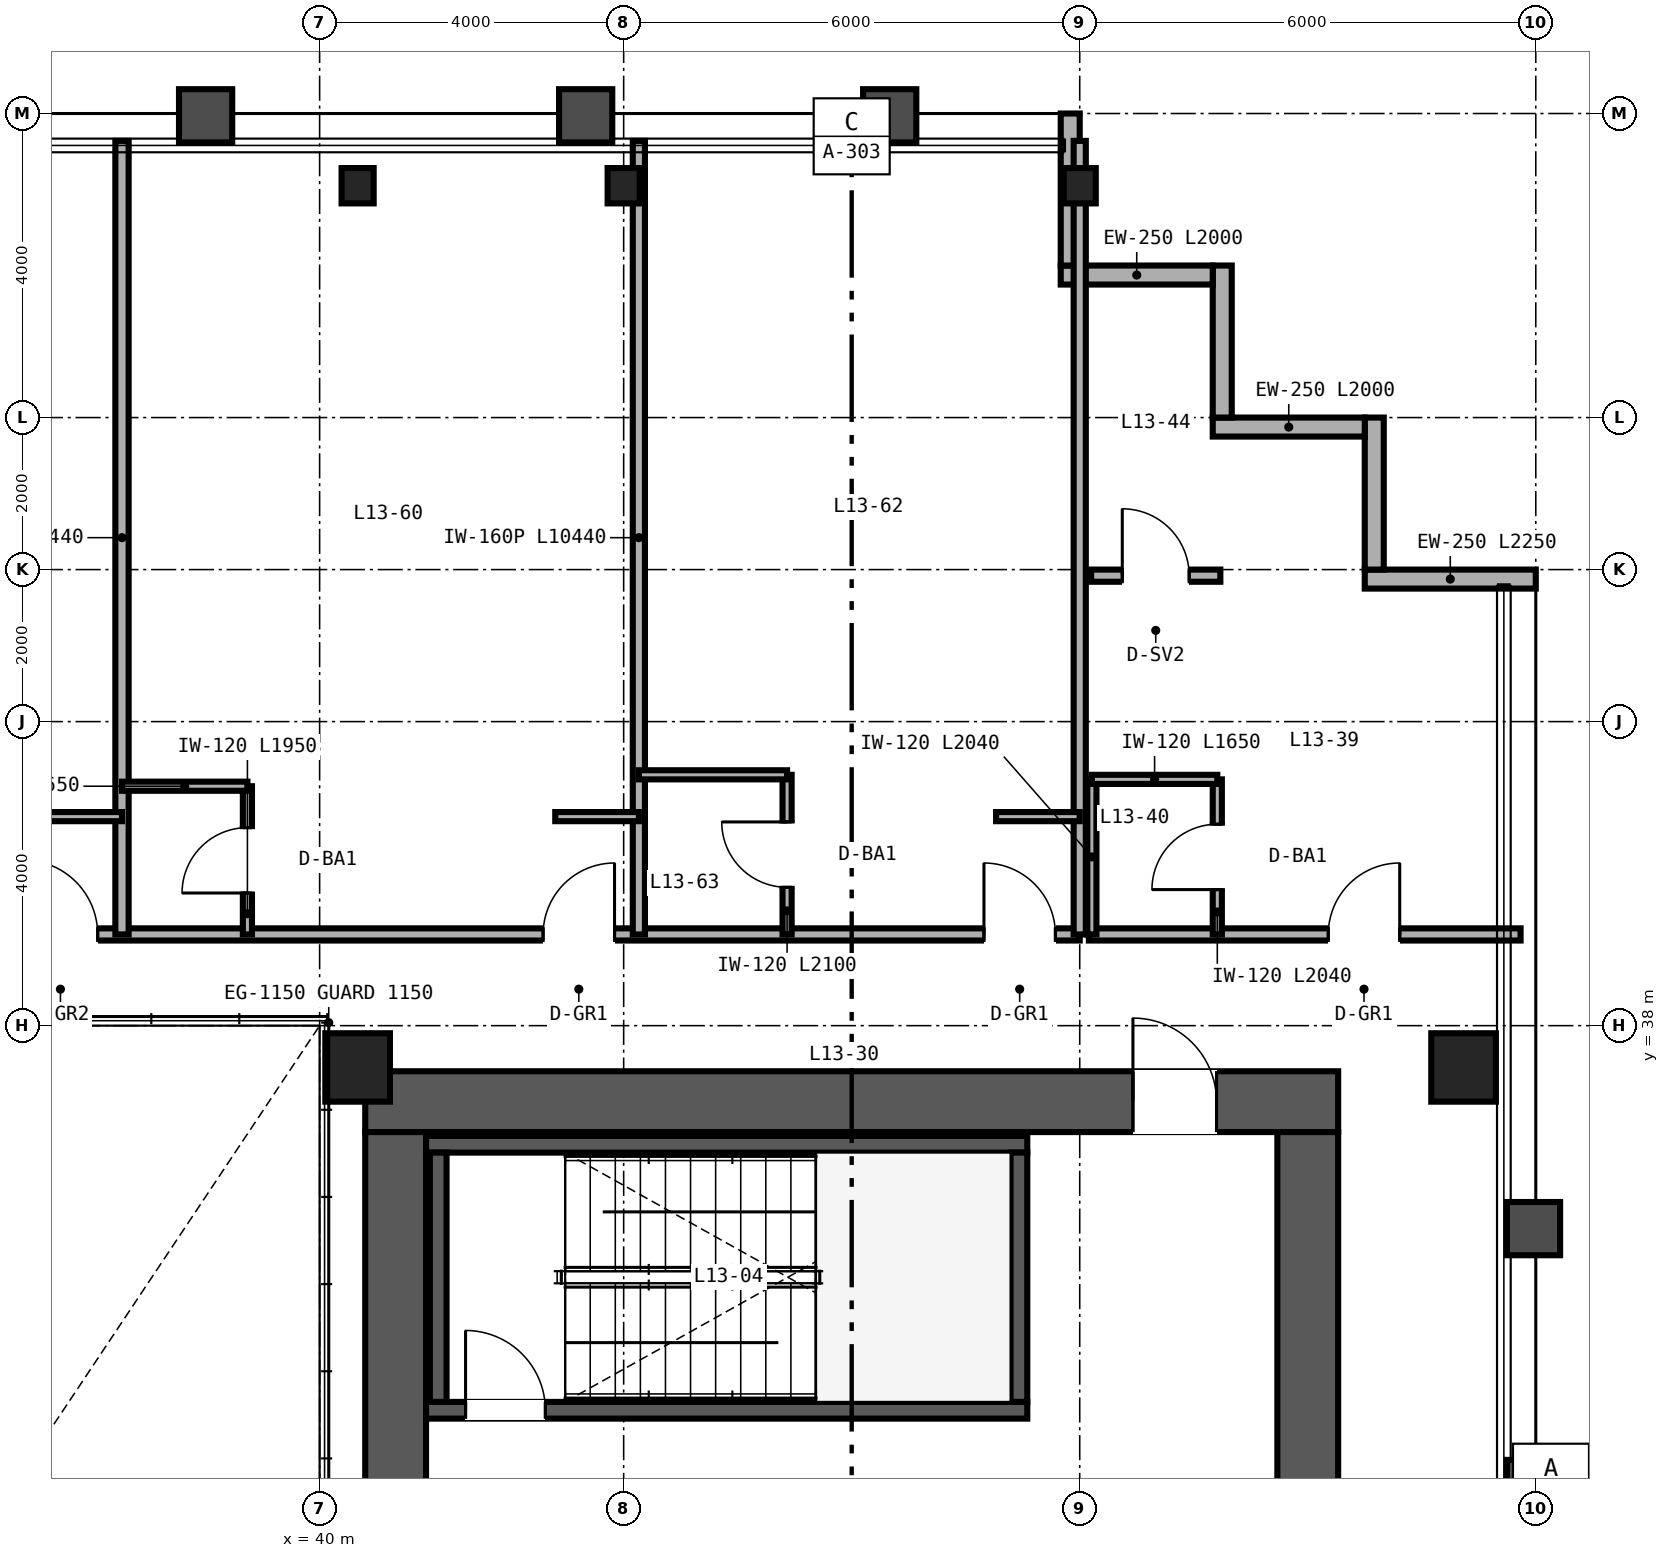
"""IFC4 building model, lengths in metres.
Left out: names, types, materials, properties, quantities, classifications, styles, units other than length and angle.
Written with IfcOpenShell. Run it as: python <this file> out.ifc"""

import sys

from ifc_helpers import new_model, si_unit, direction, frame, frame_2d, origin, origin_2d, place, context, subcontext, project, spatial, rectangle, hollow_rectangle, i_section, extrude, source, transform, mapped, element, fill, save


model = new_model("IFC4")
c1 = context("Model", 3, precision=1e-05, world=origin(), true_north=direction((0.0, 1.0)))
c2 = subcontext(c1, "Body", "Model", "MODEL_VIEW")
j1 = project(units=[si_unit("LENGTHUNIT", "METRE"), si_unit("PLANEANGLEUNIT", "RADIAN")], contexts=[c1])
p1 = place(None, origin())
s1 = spatial("IfcSite", under=j1, at=p1, CompositionType="ELEMENT")
p2 = place(p1, origin())
s2 = spatial("IfcBuilding", under=s1, at=p2, CompositionType="ELEMENT")
p3 = place(p2, frame((0.0, 0.0, 56.4)))
s3 = spatial("IfcBuildingStorey", under=s2, at=p3, CompositionType="ELEMENT", Elevation=56.4)
p4 = place(p3, frame((40.6, 37.0, 0.0), z_axis=(0.0, 0.0, 1.0), x_axis=(1.0, 0.0, 0.0)))
e1 = element("IfcWall", 1, at=p4, inside=s3, PredefinedType="SHEAR", context=c2, shape_type="SweptSolid", body=[
    extrude(rectangle(XDim=12.8, YDim=0.8, at=frame_2d((6.4, 0.0))), origin(), (0.0, 0.0, 1.0), 3.35),
])
p5 = place(p4, frame((10.1, 0.0, 0.0)))
e2 = element("IfcOpeningElement", 2, at=p5, cuts=e1, PredefinedType="OPENING", context=c2, shape_type="SweptSolid", body=[
    extrude(rectangle(XDim=1.1, YDim=2.15, at=frame_2d((0.55, 1.075))), frame((0.0, 0.41, 0.0), z_axis=(0.0, -1.0, 0.0), x_axis=(1.0, 0.0, 0.0)), (0.0, 0.0, 1.0), 0.82),
])
for number, where, z_axis, x_axis in (
    (3, (41.0, 15.4, 0.0), (0.0, 0.0, 1.0), (0.0, 1.0, 0.0)),
    (4, (53.0, 15.4, 0.0), (0.0, 0.0, 1.0), (0.0, 1.0, 0.0)),
):
    element("IfcWall", number, at=place(p3, frame(where, z_axis=z_axis, x_axis=x_axis)), inside=s3, PredefinedType="SHEAR", context=c2, shape_type="SweptSolid", body=[
        extrude(rectangle(XDim=21.2, YDim=0.8, at=frame_2d((10.6, 0.0))), origin(), (0.0, 0.0, 1.0), 3.35),
    ])
p6 = place(p3, frame((41.4, 32.94, 0.0), z_axis=(0.0, 0.0, 1.0), x_axis=(1.0, 0.0, 0.0)))
e5 = element("IfcWall", 5, at=p6, inside=s3, PredefinedType="SHEAR", context=c2, shape_type="SweptSolid", body=[
    extrude(rectangle(XDim=7.91, YDim=0.22, at=frame_2d((3.955, 0.0))), origin(), (0.0, 0.0, 1.0), 3.4),
])
p7 = place(p6, frame((0.52, 0.0, 0.0)))
e6 = element("IfcOpeningElement", 6, at=p7, cuts=e5, PredefinedType="OPENING", context=c2, shape_type="SweptSolid", body=[
    extrude(rectangle(XDim=1.05, YDim=2.15, at=frame_2d((0.525, 1.075))), frame((0.0, 0.12, 0.0), z_axis=(0.0, -1.0, 0.0), x_axis=(1.0, 0.0, 0.0)), (0.0, 0.0, 1.0), 0.24),
])
p8 = place(p3, frame((41.4, 36.44, 0.0), z_axis=(0.0, 0.0, 1.0), x_axis=(1.0, 0.0, 0.0)))
e7 = element("IfcWall", 7, at=p8, inside=s3, PredefinedType="SHEAR", context=c2, shape_type="SweptSolid", body=[
    extrude(rectangle(XDim=7.91, YDim=0.22, at=frame_2d((3.955, 0.0))), origin(), (0.0, 0.0, 1.0), 3.4),
])
for number, where, z_axis, x_axis in (
    (8, (41.56, 33.05, 0.0), (0.0, 0.0, 1.0), (0.0, 1.0, 0.0)),
    (9, (49.2, 33.05, 0.0), (0.0, 0.0, 1.0), (0.0, 1.0, 0.0)),
):
    element("IfcWall", number, at=place(p3, frame(where, z_axis=z_axis, x_axis=x_axis)), inside=s3, PredefinedType="SHEAR", context=c2, shape_type="SweptSolid", body=[
        extrude(rectangle(XDim=3.28, YDim=0.22, at=frame_2d((1.64, 0.0))), origin(), (0.0, 0.0, 1.0), 3.4),
    ])
m1 = source(origin(), c2, "Body", "SweptSolid", [
    extrude(hollow_rectangle(XDim=0.85, YDim=0.9, WallThickness=0.04, at=origin_2d()), origin(), (0.0, 0.0, 1.0), 3.35),
])
for number, where, z_axis, x_axis in (
    (10, (40.5, 37.45, 0.0), (0.0, 0.0, 1.0), (1.0, 0.0, 0.0)),
    (11, (55.05, 37.45, 0.0), (0.0, 0.0, 1.0), (1.0, 0.0, 0.0)),
):
    element("IfcColumn", number, at=place(p3, frame(where, z_axis=z_axis, x_axis=x_axis)), inside=s3, PredefinedType="COLUMN", context=c2, shape_type="MappedRepresentation", body=[
        mapped(m1, transform((0.0, 0.0, 0.0), scale=1.0)),
    ])
m2 = source(origin(), c2, "Body", "SweptSolid", [
    extrude(i_section(OverallWidth=0.422, OverallDepth=0.465, WebThickness=0.045, FlangeThickness=0.073, FilletRadius=0.025, at=origin_2d()), origin(), (0.0, 0.0, 1.0), 3.35),
])
for number, where, z_axis, x_axis in (
    (12, (40.5, 49.05, 0.0), (0.0, 0.0, 1.0), (1.0, 0.0, 0.0)),
    (13, (44.0, 49.05, 0.0), (0.0, 0.0, 1.0), (1.0, 0.0, 0.0)),
    (14, (50.0, 49.05, 0.0), (0.0, 0.0, 1.0), (1.0, 0.0, 0.0)),
):
    element("IfcColumn", number, at=place(p3, frame(where, z_axis=z_axis, x_axis=x_axis)), inside=s3, PredefinedType="COLUMN", context=c2, shape_type="MappedRepresentation", body=[
        mapped(m2, transform((0.0, 0.0, 0.0), scale=1.0)),
    ])
p9 = place(p3, frame((56.0, 43.875, 0.0), z_axis=(0.0, 0.0, 1.0), x_axis=(-1.0, 0.0, 0.0)))
e15 = element("IfcWall", 15, at=p9, inside=s3, PredefinedType="SOLIDWALL", context=c2, shape_type="SweptSolid", body=[
    extrude(rectangle(XDim=2.25, YDim=0.25, at=frame_2d((1.125, 0.0))), origin(), (0.0, 0.0, 1.0), 3.35),
])
for number, where, z_axis, x_axis in (
    (16, (53.875, 44.0, 0.0), (0.0, 0.0, 1.0), (0.0, 1.0, 0.0)),
    (17, (53.75, 45.875, 0.0), (0.0, 0.0, 1.0), (-1.0, 0.0, 0.0)),
    (18, (51.875, 46.0, 0.0), (0.0, 0.0, 1.0), (0.0, 1.0, 0.0)),
    (19, (51.75, 47.875, 0.0), (0.0, 0.0, 1.0), (-1.0, 0.0, 0.0)),
):
    element("IfcWall", number, at=place(p3, frame(where, z_axis=z_axis, x_axis=x_axis)), inside=s3, PredefinedType="SOLIDWALL", context=c2, shape_type="SweptSolid", body=[
        extrude(rectangle(XDim=2.0, YDim=0.25, at=frame_2d((1.0, 0.0))), origin(), (0.0, 0.0, 1.0), 3.35),
    ])
p10 = place(p3, frame((49.875, 48.0, 0.0), z_axis=(0.0, 0.0, 1.0), x_axis=(0.0, 1.0, 0.0)))
e20 = element("IfcWall", 20, at=p10, inside=s3, PredefinedType="SOLIDWALL", context=c2, shape_type="SweptSolid", body=[
    extrude(rectangle(XDim=2.0, YDim=0.25, at=frame_2d((1.0, 0.0))), origin(), (0.0, 0.0, 1.0), 2.657),
])
p11 = place(p3, frame((50.12, 39.2, 0.0), z_axis=(0.0, 0.0, 1.0), x_axis=(1.0, 0.0, 0.0)))
e21 = element("IfcWall", 21, at=p11, inside=s3, PredefinedType="PARTITIONING", context=c2, shape_type="SweptSolid", body=[
    extrude(rectangle(XDim=5.68, YDim=0.16, at=frame_2d((2.84, 0.0))), origin(), (0.0, 0.0, 1.0), 3.35),
])
p12 = place(p11, frame((3.15, 0.0, 0.0)))
e22 = element("IfcOpeningElement", 22, at=p12, cuts=e21, PredefinedType="OPENING", context=c2, shape_type="SweptSolid", body=[
    extrude(rectangle(XDim=0.94, YDim=2.15, at=frame_2d((0.47, 1.075))), frame((0.0, 0.09, 0.0), z_axis=(0.0, -1.0, 0.0), x_axis=(1.0, 0.0, 0.0)), (0.0, 0.0, 1.0), 0.18),
])
p13 = place(p3, frame((51.81, 39.2, 0.0), z_axis=(0.0, 0.0, 1.0), x_axis=(0.0, 1.0, 0.0)))
e23 = element("IfcWall", 23, at=p13, inside=s3, PredefinedType="PARTITIONING", context=c2, shape_type="SweptSolid", body=[
    extrude(rectangle(XDim=2.04, YDim=0.12, at=frame_2d((1.02, 0.0))), origin(), (0.0, 0.0, 1.0), 3.35),
])
p14 = place(p13, frame((0.59, 0.0, 0.0)))
e24 = element("IfcOpeningElement", 24, at=p14, cuts=e23, PredefinedType="OPENING", context=c2, shape_type="SweptSolid", body=[
    extrude(rectangle(XDim=0.86, YDim=2.1, at=frame_2d((0.43, 1.05))), frame((0.0, 0.07, 0.0), z_axis=(0.0, -1.0, 0.0), x_axis=(1.0, 0.0, 0.0)), (0.0, 0.0, 1.0), 0.14),
])
p15 = place(p3, frame((50.16, 39.2, 0.0), z_axis=(0.0, 0.0, 1.0), x_axis=(0.0, 1.0, 0.0)))
e25 = element("IfcWall", 25, at=p15, inside=s3, PredefinedType="PARTITIONING", context=c2, shape_type="SweptSolid", body=[
    extrude(rectangle(XDim=2.04, YDim=0.12, at=frame_2d((1.02, 0.0))), origin(), (0.0, 0.0, 1.0), 3.35),
])
p16 = place(p3, frame((50.16, 41.24, 0.0), z_axis=(0.0, 0.0, 1.0), x_axis=(1.0, 0.0, 0.0)))
e26 = element("IfcWall", 26, at=p16, inside=s3, PredefinedType="PARTITIONING", context=c2, shape_type="SweptSolid", body=[
    extrude(rectangle(XDim=1.65, YDim=0.12, at=frame_2d((0.825, 0.0))), origin(), (0.0, 0.0, 1.0), 3.35),
])
p17 = place(p3, frame((50.15, 43.92, 0.0), z_axis=(0.0, 0.0, 1.0), x_axis=(1.0, 0.0, 0.0)))
e27 = element("IfcWall", 27, at=p17, inside=s3, PredefinedType="PARTITIONING", context=c2, shape_type="SweptSolid", body=[
    extrude(rectangle(XDim=1.7, YDim=0.16, at=frame_2d((0.85, 0.0))), origin(), (0.0, 0.0, 1.0), 3.35),
])
p18 = place(p17, frame((0.41, 0.0, 0.0)))
e28 = element("IfcOpeningElement", 28, at=p18, cuts=e27, PredefinedType="OPENING", context=c2, shape_type="SweptSolid", body=[
    extrude(rectangle(XDim=0.88, YDim=2.15, at=frame_2d((0.44, 1.075))), frame((0.0, 0.09, 0.0), z_axis=(0.0, -1.0, 0.0), x_axis=(1.0, 0.0, 0.0)), (0.0, 0.0, 1.0), 0.18),
])
p19 = place(p3, frame((14.0, 39.2, 0.0), z_axis=(0.0, 0.0, 1.0), x_axis=(1.0, 0.0, 0.0)))
e29 = element("IfcWall", 29, at=p19, inside=s3, PredefinedType="PARTITIONING", context=c2, shape_type="SweptSolid", body=[
    extrude(rectangle(XDim=36.0, YDim=0.16, at=frame_2d((18.0, 0.0))), origin(), (0.0, 0.0, 1.0), 2.571),
])
p20 = place(p19, frame((6.5, 0.0, 0.0)))
e30 = element("IfcOpeningElement", 30, at=p20, cuts=e29, PredefinedType="OPENING", context=c2, shape_type="SweptSolid", body=[
    extrude(rectangle(XDim=0.98, YDim=2.2, at=frame_2d((0.49, 1.1))), frame((0.0, 0.09, 0.0), z_axis=(0.0, -1.0, 0.0), x_axis=(1.0, 0.0, 0.0)), (0.0, 0.0, 1.0), 0.18),
])
p21 = place(p19, frame((11.22, 0.0, 0.0)))
e31 = element("IfcOpeningElement", 31, at=p21, cuts=e29, PredefinedType="OPENING", context=c2, shape_type="SweptSolid", body=[
    extrude(rectangle(XDim=0.96, YDim=2.15, at=frame_2d((0.48, 1.075))), frame((0.0, 0.09, 0.0), z_axis=(0.0, -1.0, 0.0), x_axis=(1.0, 0.0, 0.0)), (0.0, 0.0, 1.0), 0.18),
])
p22 = place(p19, frame((22.1, 0.0, 0.0)))
e32 = element("IfcOpeningElement", 32, at=p22, cuts=e29, PredefinedType="OPENING", context=c2, shape_type="SweptSolid", body=[
    extrude(rectangle(XDim=0.98, YDim=2.2, at=frame_2d((0.49, 1.1))), frame((0.0, 0.09, 0.0), z_axis=(0.0, -1.0, 0.0), x_axis=(1.0, 0.0, 0.0)), (0.0, 0.0, 1.0), 0.18),
])
p23 = place(p19, frame((28.94, 0.0, 0.0)))
e33 = element("IfcOpeningElement", 33, at=p23, cuts=e29, PredefinedType="OPENING", context=c2, shape_type="SweptSolid", body=[
    extrude(rectangle(XDim=0.94, YDim=2.15, at=frame_2d((0.47, 1.075))), frame((0.0, 0.09, 0.0), z_axis=(0.0, -1.0, 0.0), x_axis=(1.0, 0.0, 0.0)), (0.0, 0.0, 1.0), 0.18),
])
p24 = place(p19, frame((34.74, 0.0, 0.0)))
e34 = element("IfcOpeningElement", 34, at=p24, cuts=e29, PredefinedType="OPENING", context=c2, shape_type="SweptSolid", body=[
    extrude(rectangle(XDim=0.94, YDim=2.15, at=frame_2d((0.47, 1.075))), frame((0.0, 0.09, 0.0), z_axis=(0.0, -1.0, 0.0), x_axis=(1.0, 0.0, 0.0)), (0.0, 0.0, 1.0), 0.18),
])
p25 = place(p3, frame((50.0, 39.2, 0.0), z_axis=(0.0, 0.0, 1.0), x_axis=(0.0, 1.0, 0.0)))
e35 = element("IfcWall", 35, at=p25, inside=s3, PredefinedType="PARTITIONING", context=c2, shape_type="SweptSolid", body=[
    extrude(rectangle(XDim=10.44, YDim=0.16, at=frame_2d((5.22, 0.0))), origin(), (0.0, 0.0, 1.0), 2.657),
])
p26 = place(p3, frame((37.4, 39.2, 0.0), z_axis=(0.0, 0.0, 1.0), x_axis=(0.0, 1.0, 0.0)))
e36 = element("IfcWall", 36, at=p26, inside=s3, PredefinedType="PARTITIONING", context=c2, shape_type="SweptSolid", body=[
    extrude(rectangle(XDim=10.44, YDim=0.175, at=frame_2d((5.22, 0.0))), origin(), (0.0, 0.0, 1.0), 2.423),
])
p27 = place(p3, frame((36.3, 40.75, 0.0), z_axis=(0.0, 0.0, 1.0), x_axis=(1.0, 0.0, 0.0)))
e37 = element("IfcWall", 37, at=p27, inside=s3, PredefinedType="PARTITIONING", context=c2, shape_type="SweptSolid", body=[
    extrude(rectangle(XDim=1.1, YDim=0.12, at=frame_2d((0.55, 0.0))), origin(), (0.0, 0.0, 1.0), 3.35),
])
p28 = place(p3, frame((44.2, 39.2, 0.0), z_axis=(0.0, 0.0, 1.0), x_axis=(0.0, 1.0, 0.0)))
e38 = element("IfcWall", 38, at=p28, inside=s3, PredefinedType="PARTITIONING", context=c2, shape_type="SweptSolid", body=[
    extrude(rectangle(XDim=10.44, YDim=0.16, at=frame_2d((5.22, 0.0))), origin(), (0.0, 0.0, 1.0), 2.657),
])
p29 = place(p3, frame((39.05, 39.2, 0.0), z_axis=(0.0, 0.0, 1.0), x_axis=(0.0, 1.0, 0.0)))
e39 = element("IfcWall", 39, at=p29, inside=s3, PredefinedType="PARTITIONING", context=c2, shape_type="SweptSolid", body=[
    extrude(rectangle(XDim=1.95, YDim=0.12, at=frame_2d((0.975, 0.0))), origin(), (0.0, 0.0, 1.0), 3.35),
])
p30 = place(p29, frame((0.545, 0.0, 0.0)))
e40 = element("IfcOpeningElement", 40, at=p30, cuts=e39, PredefinedType="OPENING", context=c2, shape_type="SweptSolid", body=[
    extrude(rectangle(XDim=0.86, YDim=2.1, at=frame_2d((0.43, 1.05))), frame((0.0, 0.07, 0.0), z_axis=(0.0, -1.0, 0.0), x_axis=(1.0, 0.0, 0.0)), (0.0, 0.0, 1.0), 0.14),
])
p31 = place(p3, frame((37.4, 41.15, 0.0), z_axis=(0.0, 0.0, 1.0), x_axis=(1.0, 0.0, 0.0)))
e41 = element("IfcWall", 41, at=p31, inside=s3, PredefinedType="PARTITIONING", context=c2, shape_type="SweptSolid", body=[
    extrude(rectangle(XDim=1.65, YDim=0.12, at=frame_2d((0.825, 0.0))), origin(), (0.0, 0.0, 1.0), 3.35),
])
p32 = place(p3, frame((43.1, 40.75, 0.0), z_axis=(0.0, 0.0, 1.0), x_axis=(1.0, 0.0, 0.0)))
e42 = element("IfcWall", 42, at=p32, inside=s3, PredefinedType="PARTITIONING", context=c2, shape_type="SweptSolid", body=[
    extrude(rectangle(XDim=1.1, YDim=0.12, at=frame_2d((0.55, 0.0))), origin(), (0.0, 0.0, 1.0), 3.35),
])
p33 = place(p3, frame((46.15, 39.2, 0.0), z_axis=(0.0, 0.0, 1.0), x_axis=(0.0, 1.0, 0.0)))
e43 = element("IfcWall", 43, at=p33, inside=s3, PredefinedType="PARTITIONING", context=c2, shape_type="SweptSolid", body=[
    extrude(rectangle(XDim=2.1, YDim=0.12, at=frame_2d((1.05, 0.0))), origin(), (0.0, 0.0, 1.0), 3.35),
])
p34 = place(p33, frame((0.62, 0.0, 0.0)))
e44 = element("IfcOpeningElement", 44, at=p34, cuts=e43, PredefinedType="OPENING", context=c2, shape_type="SweptSolid", body=[
    extrude(rectangle(XDim=0.86, YDim=2.1, at=frame_2d((0.43, 1.05))), frame((0.0, 0.07, 0.0), z_axis=(0.0, -1.0, 0.0), x_axis=(1.0, 0.0, 0.0)), (0.0, 0.0, 1.0), 0.14),
])
p35 = place(p3, frame((44.2, 41.3, 0.0), z_axis=(0.0, 0.0, 1.0), x_axis=(1.0, 0.0, 0.0)))
e45 = element("IfcWall", 45, at=p35, inside=s3, PredefinedType="PARTITIONING", context=c2, shape_type="SweptSolid", body=[
    extrude(rectangle(XDim=1.95, YDim=0.12, at=frame_2d((0.975, 0.0))), origin(), (0.0, 0.0, 1.0), 3.35),
])
p36 = place(p3, frame((48.9, 40.75, 0.0), z_axis=(0.0, 0.0, 1.0), x_axis=(1.0, 0.0, 0.0)))
e46 = element("IfcWall", 46, at=p36, inside=s3, PredefinedType="PARTITIONING", context=c2, shape_type="SweptSolid", body=[
    extrude(rectangle(XDim=1.1, YDim=0.12, at=frame_2d((0.55, 0.0))), origin(), (0.0, 0.0, 1.0), 3.35),
])
m3 = source(origin(), c2, "Body", "SweptSolid", [
    extrude(rectangle(XDim=1.05, YDim=2.15, at=frame_2d((0.525, 1.075))), frame((0.0, 0.025, 0.0), z_axis=(0.0, -1.0, 0.0), x_axis=(1.0, 0.0, 0.0)), (0.0, 0.0, 1.0), 0.05),
])
p37 = place(p7, origin())
e47 = element("IfcDoor", 47, at=p37, inside=s3, OperationType="SINGLE_SWING_LEFT", PredefinedType="DOOR", context=c2, shape_type="MappedRepresentation", body=[
    mapped(m3, transform((0.0, 0.0, 0.0), scale=1.0)),
])
fill(e6, e47)
m4 = source(origin(), c2, "Body", "SweptSolid", [
    extrude(rectangle(XDim=1.1, YDim=2.15, at=frame_2d((0.55, 1.075))), frame((0.0, 0.025, 0.0), z_axis=(0.0, -1.0, 0.0), x_axis=(1.0, 0.0, 0.0)), (0.0, 0.0, 1.0), 0.05),
])
p38 = place(p5, origin())
e48 = element("IfcDoor", 48, at=p38, inside=s3, OperationType="SINGLE_SWING_LEFT", PredefinedType="DOOR", context=c2, shape_type="MappedRepresentation", body=[
    mapped(m4, transform((0.0, 0.0, 0.0), scale=1.0)),
])
fill(e2, e48)
m5 = source(origin(), c2, "Body", "SweptSolid", [
    extrude(rectangle(XDim=0.86, YDim=2.1, at=frame_2d((0.43, 1.05))), frame((0.0, 0.025, 0.0), z_axis=(0.0, -1.0, 0.0), x_axis=(1.0, 0.0, 0.0)), (0.0, 0.0, 1.0), 0.05),
])
p39 = place(p14, origin())
e49 = element("IfcDoor", 49, at=p39, inside=s3, OperationType="SINGLE_SWING_LEFT", PredefinedType="DOOR", context=c2, shape_type="MappedRepresentation", body=[
    mapped(m5, transform((0.0, 0.0, 0.0), scale=1.0)),
])
fill(e24, e49)
m6 = source(origin(), c2, "Body", "SweptSolid", [
    extrude(rectangle(XDim=0.94, YDim=2.15, at=frame_2d((0.47, 1.075))), frame((0.0, 0.025, 0.0), z_axis=(0.0, -1.0, 0.0), x_axis=(1.0, 0.0, 0.0)), (0.0, 0.0, 1.0), 0.05),
])
p40 = place(p12, origin())
e50 = element("IfcDoor", 50, at=p40, inside=s3, OperationType="SINGLE_SWING_RIGHT", PredefinedType="DOOR", context=c2, shape_type="MappedRepresentation", body=[
    mapped(m6, transform((0.0, 0.0, 0.0), scale=1.0)),
])
fill(e22, e50)
m7 = source(origin(), c2, "Body", "SweptSolid", [
    extrude(rectangle(XDim=0.88, YDim=2.15, at=frame_2d((0.44, 1.075))), frame((0.0, 0.025, 0.0), z_axis=(0.0, -1.0, 0.0), x_axis=(1.0, 0.0, 0.0)), (0.0, 0.0, 1.0), 0.05),
])
p41 = place(p18, origin())
e51 = element("IfcDoor", 51, at=p41, inside=s3, OperationType="SINGLE_SWING_LEFT", PredefinedType="DOOR", context=c2, shape_type="MappedRepresentation", body=[
    mapped(m7, transform((0.0, 0.0, 0.0), scale=1.0)),
])
fill(e28, e51)
p42 = place(p30, origin())
e52 = element("IfcDoor", 52, at=p42, inside=s3, OperationType="SINGLE_SWING_LEFT", PredefinedType="DOOR", context=c2, shape_type="MappedRepresentation", body=[
    mapped(m5, transform((0.0, 0.0, 0.0), scale=1.0)),
])
fill(e40, e52)
p43 = place(p34, origin())
e53 = element("IfcDoor", 53, at=p43, inside=s3, OperationType="SINGLE_SWING_RIGHT", PredefinedType="DOOR", context=c2, shape_type="MappedRepresentation", body=[
    mapped(m5, transform((0.0, 0.0, 0.0), scale=1.0)),
])
fill(e44, e53)
m8 = source(origin(), c2, "Body", "SweptSolid", [
    extrude(rectangle(XDim=0.98, YDim=2.2, at=frame_2d((0.49, 1.1))), frame((0.0, 0.025, 0.0), z_axis=(0.0, -1.0, 0.0), x_axis=(1.0, 0.0, 0.0)), (0.0, 0.0, 1.0), 0.05),
])
p44 = place(p22, origin())
e54 = element("IfcDoor", 54, at=p44, inside=s3, OperationType="SINGLE_SWING_LEFT", PredefinedType="DOOR", context=c2, shape_type="MappedRepresentation", body=[
    mapped(m8, transform((0.0, 0.0, 0.0), scale=1.0)),
])
fill(e32, e54)
p45 = place(p23, origin())
e55 = element("IfcDoor", 55, at=p45, inside=s3, OperationType="SINGLE_SWING_RIGHT", PredefinedType="DOOR", context=c2, shape_type="MappedRepresentation", body=[
    mapped(m6, transform((0.0, 0.0, 0.0), scale=1.0)),
])
fill(e33, e55)
p46 = place(p24, origin())
e56 = element("IfcDoor", 56, at=p46, inside=s3, OperationType="SINGLE_SWING_LEFT", PredefinedType="DOOR", context=c2, shape_type="MappedRepresentation", body=[
    mapped(m6, transform((0.0, 0.0, 0.0), scale=1.0)),
])
fill(e34, e56)
save(model, sys.argv[1])
